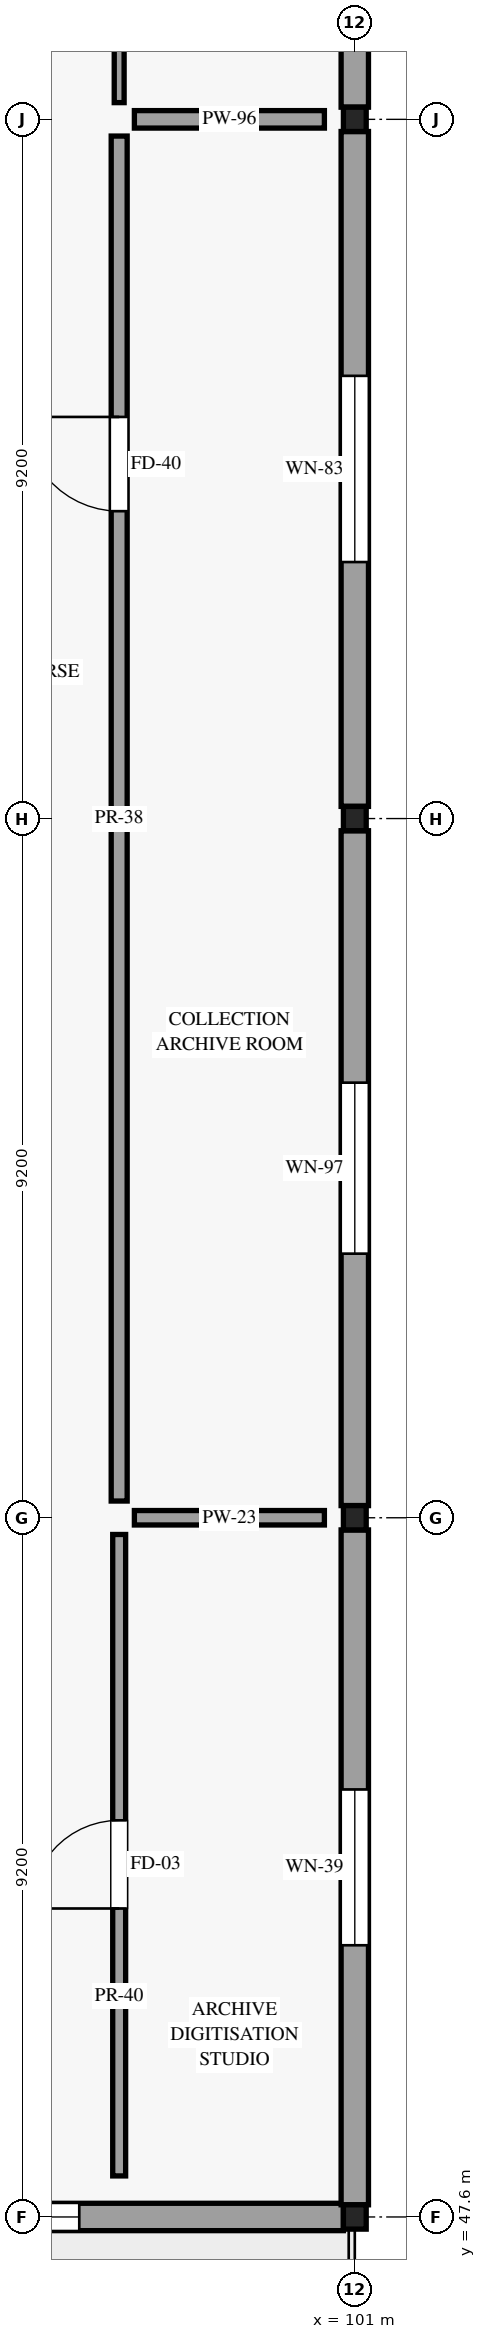
"""IFC4 building model, lengths in metres.
Left out: names, types, materials, properties, quantities, classifications, styles, units other than length and angle.
Written with IfcOpenShell. Run it as: python <this file> out.ifc"""

import sys

from ifc_helpers import new_model, si_unit, direction, frame, frame_2d, origin, origin_2d, place, context, subcontext, project, spatial, rectangle, i_section, extrude, element, fill, save


model = new_model("IFC4")
c1 = context("Model", 3, precision=1e-05, world=origin(), true_north=direction((0.0, 1.0)))
c2 = subcontext(c1, "Body", "Model", "MODEL_VIEW")
j1 = project(units=[si_unit("LENGTHUNIT", "METRE"), si_unit("PLANEANGLEUNIT", "RADIAN")], contexts=[c1])
p1 = place(None, origin())
s1 = spatial("IfcSite", under=j1, at=p1, CompositionType="ELEMENT")
p2 = place(p1, origin())
s2 = spatial("IfcBuilding", under=s1, at=p2, CompositionType="ELEMENT")
p3 = place(p2, frame((0.0, 0.0, 19.5)))
s3 = spatial("IfcBuildingStorey", under=s2, at=p3, CompositionType="ELEMENT", Elevation=19.5)
for number, where, z_axis, x_axis in (
    (1, (101.0, 47.6, 0.0), (0.0, 0.0, 1.0), (1.0, 0.0, 0.0)),
    (2, (101.0, 56.8, 0.0), (0.0, 0.0, 1.0), (1.0, 0.0, 0.0)),
    (3, (101.0, 66.0, 0.0), (0.0, 0.0, 1.0), (1.0, 0.0, 0.0)),
    (4, (101.0, 75.2, 0.0), (0.0, 0.0, 1.0), (1.0, 0.0, 0.0)),
):
    element("IfcColumn", number, at=place(p3, frame(where, z_axis=z_axis, x_axis=x_axis)), inside=s3, PredefinedType="COLUMN", context=c2, shape_type="SweptSolid", body=[
        extrude(i_section(OverallWidth=0.3, OverallDepth=0.32, WebThickness=0.011, FlangeThickness=0.021, FilletRadius=0.027, at=origin_2d()), origin(), (0.0, 0.0, 1.0), 4.5),
    ])
p4 = place(p3, frame((92.15, 47.6, 0.0), z_axis=(0.0, 0.0, 1.0), x_axis=(1.0, 0.0, 0.0)))
e5 = element("IfcWall", 5, at=p4, inside=s3, PredefinedType="STANDARD", context=c2, shape_type="SweptSolid", body=[
    extrude(rectangle(XDim=8.7, YDim=0.36, at=frame_2d((4.35, 0.0))), origin(), (0.0, 0.0, 1.0), 3.805),
])
p5 = place(p4, frame((5.225, 0.0, 0.85), z_axis=(0.0, 0.0, 1.0), x_axis=(-1.0, 0.0, 0.0)))
e6 = element("IfcOpeningElement", 6, at=p5, cuts=e5, PredefinedType="OPENING", context=c2, shape_type="SweptSolid", body=[
    extrude(rectangle(XDim=1.75, YDim=2.05, at=frame_2d((0.875, 1.025))), frame((0.0, 0.19, 0.0), z_axis=(0.0, -1.0, 0.0), x_axis=(1.0, 0.0, 0.0)), (0.0, 0.0, 1.0), 0.38),
])
p6 = place(p3, frame((101.0, 47.76, 0.0), z_axis=(0.0, 0.0, 1.0), x_axis=(0.0, 1.0, 0.0)))
e7 = element("IfcWall", 7, at=p6, inside=s3, PredefinedType="STANDARD", context=c2, shape_type="SweptSolid", body=[
    extrude(rectangle(XDim=8.88, YDim=0.36, at=frame_2d((4.44, 0.0))), origin(), (0.0, 0.0, 1.0), 3.805),
])
p7 = place(p6, frame((5.465, 0.0, 0.85), z_axis=(0.0, 0.0, 1.0), x_axis=(-1.0, 0.0, 0.0)))
e8 = element("IfcOpeningElement", 8, at=p7, cuts=e7, PredefinedType="OPENING", context=c2, shape_type="SweptSolid", body=[
    extrude(rectangle(XDim=2.05, YDim=2.2, at=frame_2d((1.025, 1.1))), frame((0.0, 0.19, 0.0), z_axis=(0.0, -1.0, 0.0), x_axis=(1.0, 0.0, 0.0)), (0.0, 0.0, 1.0), 0.38),
])
p8 = place(p3, frame((101.0, 56.96, 0.0), z_axis=(0.0, 0.0, 1.0), x_axis=(0.0, 1.0, 0.0)))
e9 = element("IfcWall", 9, at=p8, inside=s3, PredefinedType="STANDARD", context=c2, shape_type="SweptSolid", body=[
    extrude(rectangle(XDim=8.88, YDim=0.36, at=frame_2d((4.44, 0.0))), origin(), (0.0, 0.0, 1.0), 3.805),
])
p9 = place(p8, frame((5.565, 0.0, 0.85), z_axis=(0.0, 0.0, 1.0), x_axis=(-1.0, 0.0, 0.0)))
e10 = element("IfcOpeningElement", 10, at=p9, cuts=e9, PredefinedType="OPENING", context=c2, shape_type="SweptSolid", body=[
    extrude(rectangle(XDim=2.25, YDim=2.3, at=frame_2d((1.125, 1.15))), frame((0.0, 0.19, 0.0), z_axis=(0.0, -1.0, 0.0), x_axis=(1.0, 0.0, 0.0)), (0.0, 0.0, 1.0), 0.38),
])
p10 = place(p3, frame((101.0, 66.16, 0.0), z_axis=(0.0, 0.0, 1.0), x_axis=(0.0, 1.0, 0.0)))
e11 = element("IfcWall", 11, at=p10, inside=s3, PredefinedType="STANDARD", context=c2, shape_type="SweptSolid", body=[
    extrude(rectangle(XDim=8.88, YDim=0.36, at=frame_2d((4.44, 0.0))), origin(), (0.0, 0.0, 1.0), 3.805),
])
p11 = place(p10, frame((5.665, 0.0, 0.85), z_axis=(0.0, 0.0, 1.0), x_axis=(-1.0, 0.0, 0.0)))
e12 = element("IfcOpeningElement", 12, at=p11, cuts=e11, PredefinedType="OPENING", context=c2, shape_type="SweptSolid", body=[
    extrude(rectangle(XDim=2.45, YDim=2.4, at=frame_2d((1.225, 1.2))), frame((0.0, 0.19, 0.0), z_axis=(0.0, -1.0, 0.0), x_axis=(1.0, 0.0, 0.0)), (0.0, 0.0, 1.0), 0.38),
])
p12 = place(p3, frame((101.0, 75.36, 0.0), z_axis=(0.0, 0.0, 1.0), x_axis=(0.0, 1.0, 0.0)))
e13 = element("IfcWall", 13, at=p12, inside=s3, PredefinedType="STANDARD", context=c2, shape_type="SweptSolid", body=[
    extrude(rectangle(XDim=8.88, YDim=0.36, at=frame_2d((4.44, 0.0))), origin(), (0.0, 0.0, 1.0), 3.805),
])
p13 = place(p12, frame((5.765, 0.0, 0.85), z_axis=(0.0, 0.0, 1.0), x_axis=(-1.0, 0.0, 0.0)))
e14 = element("IfcOpeningElement", 14, at=p13, cuts=e13, PredefinedType="OPENING", context=c2, shape_type="SweptSolid", body=[
    extrude(rectangle(XDim=2.65, YDim=2.45, at=frame_2d((1.325, 1.225))), frame((0.0, 0.19, 0.0), z_axis=(0.0, -1.0, 0.0), x_axis=(1.0, 0.0, 0.0)), (0.0, 0.0, 1.0), 0.38),
])
p14 = place(p3, frame((97.9, 48.14, 0.0), z_axis=(0.0, 0.0, 1.0), x_axis=(0.0, 1.0, 0.0)))
e15 = element("IfcWall", 15, at=p14, inside=s3, PredefinedType="PARTITIONING", context=c2, shape_type="SweptSolid", body=[
    extrude(rectangle(XDim=8.44, YDim=0.17, at=frame_2d((4.22, 0.0))), origin(), (0.0, 0.0, 1.0), 3.805),
])
p15 = place(p14, frame((3.519, 0.0, 0.0)))
e16 = element("IfcOpeningElement", 16, at=p15, cuts=e15, PredefinedType="OPENING", context=c2, shape_type="SweptSolid", body=[
    extrude(rectangle(XDim=1.16, YDim=2.28, at=frame_2d((0.58, 1.14))), frame((0.0, 0.095, 0.0), z_axis=(0.0, -1.0, 0.0), x_axis=(1.0, 0.0, 0.0)), (0.0, 0.0, 1.0), 0.19),
])
p16 = place(p3, frame((98.1, 56.8, 0.0), z_axis=(0.0, 0.0, 1.0), x_axis=(1.0, 0.0, 0.0)))
e17 = element("IfcWall", 17, at=p16, inside=s3, PredefinedType="PARTITIONING", context=c2, shape_type="SweptSolid", body=[
    extrude(rectangle(XDim=2.5, YDim=0.19, at=frame_2d((1.25, 0.0))), origin(), (0.0, 0.0, 1.0), 3.805),
])
p17 = place(p3, frame((97.9, 57.02, 0.0), z_axis=(0.0, 0.0, 1.0), x_axis=(0.0, 1.0, 0.0)))
e18 = element("IfcWall", 18, at=p17, inside=s3, PredefinedType="PARTITIONING", context=c2, shape_type="SweptSolid", body=[
    extrude(rectangle(XDim=17.96, YDim=0.21, at=frame_2d((8.98, 0.0))), origin(), (0.0, 0.0, 1.0), 3.805),
])
p18 = place(p17, frame((13.024, 0.0, 0.0)))
e19 = element("IfcOpeningElement", 19, at=p18, cuts=e18, PredefinedType="OPENING", context=c2, shape_type="SweptSolid", body=[
    extrude(rectangle(XDim=1.24, YDim=2.32, at=frame_2d((0.62, 1.16))), frame((0.0, 0.115, 0.0), z_axis=(0.0, -1.0, 0.0), x_axis=(1.0, 0.0, 0.0)), (0.0, 0.0, 1.0), 0.23),
])
p19 = place(p3, frame((98.1, 75.2, 0.0), z_axis=(0.0, 0.0, 1.0), x_axis=(1.0, 0.0, 0.0)))
e20 = element("IfcWall", 20, at=p19, inside=s3, PredefinedType="PARTITIONING", context=c2, shape_type="SweptSolid", body=[
    extrude(rectangle(XDim=2.5, YDim=0.23, at=frame_2d((1.25, 0.0))), origin(), (0.0, 0.0, 1.0), 3.805),
])
p20 = place(p3, frame((97.9, 75.42, 0.0), z_axis=(0.0, 0.0, 1.0), x_axis=(0.0, 1.0, 0.0)))
e21 = element("IfcWall", 21, at=p20, inside=s3, PredefinedType="PARTITIONING", context=c2, shape_type="SweptSolid", body=[
    extrude(rectangle(XDim=8.44, YDim=0.13, at=frame_2d((4.22, 0.0))), origin(), (0.0, 0.0, 1.0), 3.805),
])
p21 = place(p20, frame((3.572, 0.0, 0.0)))
e22 = element("IfcOpeningElement", 22, at=p21, cuts=e21, PredefinedType="OPENING", context=c2, shape_type="SweptSolid", body=[
    extrude(rectangle(XDim=1.46, YDim=2.32, at=frame_2d((0.73, 1.16))), frame((0.0, 0.075, 0.0), z_axis=(0.0, -1.0, 0.0), x_axis=(1.0, 0.0, 0.0)), (0.0, 0.0, 1.0), 0.15),
])
p22 = place(p5, origin())
e23 = element("IfcWindow", 23, at=p22, inside=s3, PartitioningType="SINGLE_PANEL", PredefinedType="WINDOW", context=c2, shape_type="SweptSolid", body=[
    extrude(rectangle(XDim=1.75, YDim=2.05, at=frame_2d((0.875, 1.025))), frame((0.0, 0.03, 0.0), z_axis=(0.0, -1.0, 0.0), x_axis=(1.0, 0.0, 0.0)), (0.0, 0.0, 1.0), 0.06),
])
fill(e6, e23)
p23 = place(p7, origin())
e24 = element("IfcWindow", 24, at=p23, inside=s3, PartitioningType="SINGLE_PANEL", PredefinedType="WINDOW", context=c2, shape_type="SweptSolid", body=[
    extrude(rectangle(XDim=2.05, YDim=2.2, at=frame_2d((1.025, 1.1))), frame((0.0, 0.03, 0.0), z_axis=(0.0, -1.0, 0.0), x_axis=(1.0, 0.0, 0.0)), (0.0, 0.0, 1.0), 0.06),
])
fill(e8, e24)
p24 = place(p9, origin())
e25 = element("IfcWindow", 25, at=p24, inside=s3, PartitioningType="SINGLE_PANEL", PredefinedType="WINDOW", context=c2, shape_type="SweptSolid", body=[
    extrude(rectangle(XDim=2.25, YDim=2.3, at=frame_2d((1.125, 1.15))), frame((0.0, 0.03, 0.0), z_axis=(0.0, -1.0, 0.0), x_axis=(1.0, 0.0, 0.0)), (0.0, 0.0, 1.0), 0.06),
])
fill(e10, e25)
p25 = place(p11, origin())
e26 = element("IfcWindow", 26, at=p25, inside=s3, PartitioningType="SINGLE_PANEL", PredefinedType="WINDOW", context=c2, shape_type="SweptSolid", body=[
    extrude(rectangle(XDim=2.45, YDim=2.4, at=frame_2d((1.225, 1.2))), frame((0.0, 0.03, 0.0), z_axis=(0.0, -1.0, 0.0), x_axis=(1.0, 0.0, 0.0)), (0.0, 0.0, 1.0), 0.06),
])
fill(e12, e26)
p26 = place(p15, origin())
e27 = element("IfcDoor", 27, at=p26, inside=s3, OperationType="SINGLE_SWING_LEFT", PredefinedType="DOOR", context=c2, shape_type="SweptSolid", body=[
    extrude(rectangle(XDim=1.16, YDim=2.28, at=frame_2d((0.58, 1.14))), frame((0.0, 0.025, 0.0), z_axis=(0.0, -1.0, 0.0), x_axis=(1.0, 0.0, 0.0)), (0.0, 0.0, 1.0), 0.05),
])
fill(e16, e27)
p27 = place(p18, origin())
e28 = element("IfcDoor", 28, at=p27, inside=s3, OperationType="SINGLE_SWING_RIGHT", PredefinedType="DOOR", context=c2, shape_type="SweptSolid", body=[
    extrude(rectangle(XDim=1.24, YDim=2.32, at=frame_2d((0.62, 1.16))), frame((0.0, 0.025, 0.0), z_axis=(0.0, -1.0, 0.0), x_axis=(1.0, 0.0, 0.0)), (0.0, 0.0, 1.0), 0.05),
])
fill(e19, e28)
save(model, sys.argv[1])
